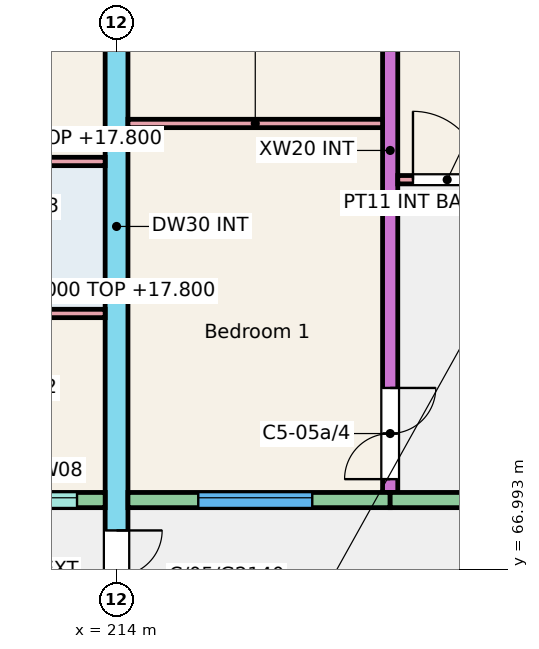
"""IFC4 building model, lengths in metres.
Left out: names, types, materials, properties, quantities, classifications, styles, units other than length and angle.
Written with IfcOpenShell. Run it as: python <this file> out.ifc"""

import sys

from ifc_helpers import new_model, si_unit, direction, frame, frame_2d, origin, place, context, subcontext, project, spatial, rectangle, extrude, element, fill, save


model = new_model("IFC4")
c1 = context("Model", 3, precision=1e-05, world=origin(), true_north=direction((0.0, 1.0)))
c2 = subcontext(c1, "Body", "Model", "MODEL_VIEW")
j1 = project(units=[si_unit("LENGTHUNIT", "METRE"), si_unit("PLANEANGLEUNIT", "RADIAN")], contexts=[c1])
p1 = place(None, origin())
s1 = spatial("IfcSite", under=j1, at=p1, CompositionType="ELEMENT")
p2 = place(p1, origin())
s2 = spatial("IfcBuilding", under=s1, at=p2, CompositionType="ELEMENT")
p3 = place(p2, frame((0.0, 0.0, 15.0)))
s3 = spatial("IfcBuildingStorey", under=s2, at=p3, CompositionType="ELEMENT", Elevation=15.0)
p4 = place(p3, frame((214.0, 66.0, 0.0), z_axis=(0.0, 0.0, 1.0), x_axis=(0.0, 1.0, 0.0)))
e1 = element("IfcWall", 1, at=p4, inside=s3, PredefinedType="SHEAR", context=c2, shape_type="SweptSolid", body=[
    extrude(rectangle(XDim=11.0, YDim=0.3, at=frame_2d((5.5, 0.0))), origin(), (0.0, 0.0, 1.0), 3.0),
])
p5 = place(p4, frame((0.3, 0.0, 0.0)))
e2 = element("IfcOpeningElement", 2, at=p5, cuts=e1, PredefinedType="OPENING", context=c2, shape_type="SweptSolid", body=[
    extrude(rectangle(XDim=1.2, YDim=2.1, at=frame_2d((0.6, 1.05))), frame((0.0, 0.16, 0.0), z_axis=(0.0, -1.0, 0.0), x_axis=(1.0, 0.0, 0.0)), (0.0, 0.0, 1.0), 0.32),
])
p6 = place(p3, frame((217.6, 68.0, 0.0), z_axis=(0.0, 0.0, 1.0), x_axis=(0.0, 1.0, 0.0)))
e3 = element("IfcWall", 3, at=p6, inside=s3, PredefinedType="SHEAR", context=c2, shape_type="SweptSolid", body=[
    extrude(rectangle(XDim=9.0, YDim=0.2, at=frame_2d((4.5, 0.0))), origin(), (0.0, 0.0, 1.0), 3.0),
])
p7 = place(p6, frame((0.175, 0.0, 0.0)))
e4 = element("IfcOpeningElement", 4, at=p7, cuts=e3, PredefinedType="OPENING", context=c2, shape_type="SweptSolid", body=[
    extrude(rectangle(XDim=1.2, YDim=2.1, at=frame_2d((0.6, 1.05))), frame((0.0, 0.11, 0.0), z_axis=(0.0, -1.0, 0.0), x_axis=(1.0, 0.0, 0.0)), (0.0, 0.0, 1.0), 0.22),
])
p8 = place(p6, frame((6.4, 0.0, 0.0)))
e5 = element("IfcOpeningElement", 5, at=p8, cuts=e3, PredefinedType="OPENING", context=c2, shape_type="SweptSolid", body=[
    extrude(rectangle(XDim=1.2, YDim=2.1, at=frame_2d((0.6, 1.05))), frame((0.0, 0.11, 0.0), z_axis=(0.0, -1.0, 0.0), x_axis=(1.0, 0.0, 0.0)), (0.0, 0.0, 1.0), 0.22),
])
p9 = place(p3, frame((210.4, 67.9, 0.0), z_axis=(0.0, 0.0, 1.0), x_axis=(1.0, 0.0, 0.0)))
e6 = element("IfcWall", 6, at=p9, inside=s3, PredefinedType="SOLIDWALL", context=c2, shape_type="SweptSolid", body=[
    extrude(rectangle(XDim=3.45, YDim=0.2, at=frame_2d((1.725, 0.0))), origin(), (0.0, 0.0, 1.0), 3.0),
])
p10 = place(p9, frame((1.88, 0.0, 1.1)))
e7 = element("IfcOpeningElement", 7, at=p10, cuts=e6, PredefinedType="OPENING", context=c2, shape_type="SweptSolid", body=[
    extrude(rectangle(XDim=1.2, YDim=1.3, at=frame_2d((0.6, 0.65))), frame((0.0, 0.11, 0.0), z_axis=(0.0, -1.0, 0.0), x_axis=(1.0, 0.0, 0.0)), (0.0, 0.0, 1.0), 0.22),
])
p11 = place(p9, frame((0.25, 0.0, 0.0)))
e8 = element("IfcOpeningElement", 8, at=p11, cuts=e6, PredefinedType="OPENING", context=c2, shape_type="SweptSolid", body=[
    extrude(rectangle(XDim=1.0, YDim=2.1, at=frame_2d((0.5, 1.05))), frame((0.0, 0.11, 0.0), z_axis=(0.0, -1.0, 0.0), x_axis=(1.0, 0.0, 0.0)), (0.0, 0.0, 1.0), 0.22),
])
p12 = place(p3, frame((214.15, 67.9, 0.0), z_axis=(0.0, 0.0, 1.0), x_axis=(1.0, 0.0, 0.0)))
e9 = element("IfcWall", 9, at=p12, inside=s3, PredefinedType="SOLIDWALL", context=c2, shape_type="SweptSolid", body=[
    extrude(rectangle(XDim=3.45, YDim=0.2, at=frame_2d((1.725, 0.0))), origin(), (0.0, 0.0, 1.0), 3.0),
])
p13 = place(p12, frame((0.925, 0.0, 0.9)))
e10 = element("IfcOpeningElement", 10, at=p13, cuts=e9, PredefinedType="OPENING", context=c2, shape_type="SweptSolid", body=[
    extrude(rectangle(XDim=1.5, YDim=1.5, at=frame_2d((0.75, 0.75))), frame((0.0, 0.11, 0.0), z_axis=(0.0, -1.0, 0.0), x_axis=(1.0, 0.0, 0.0)), (0.0, 0.0, 1.0), 0.22),
])
p14 = place(p3, frame((217.6, 67.9, 0.0), z_axis=(0.0, 0.0, 1.0), x_axis=(1.0, 0.0, 0.0)))
e11 = element("IfcWall", 11, at=p14, inside=s3, PredefinedType="SOLIDWALL", context=c2, shape_type="SweptSolid", body=[
    extrude(rectangle(XDim=3.6, YDim=0.2, at=frame_2d((1.8, 0.0))), origin(), (0.0, 0.0, 1.0), 3.0),
])
p15 = place(p14, frame((1.3, 0.0, 0.0)))
e12 = element("IfcOpeningElement", 12, at=p15, cuts=e11, PredefinedType="OPENING", context=c2, shape_type="SweptSolid", body=[
    extrude(rectangle(XDim=1.0, YDim=2.1, at=frame_2d((0.5, 1.05))), frame((0.0, 0.11, 0.0), z_axis=(0.0, -1.0, 0.0), x_axis=(1.0, 0.0, 0.0)), (0.0, 0.0, 1.0), 0.22),
])
p16 = place(p3, frame((211.91, 70.355, 0.0), z_axis=(0.0, 0.0, 1.0), x_axis=(1.0, 0.0, 0.0)))
e13 = element("IfcWall", 13, at=p16, inside=s3, PredefinedType="PARTITIONING", context=c2, shape_type="SweptSolid", body=[
    extrude(rectangle(XDim=1.94, YDim=0.11, at=frame_2d((0.97, 0.0))), origin(), (0.0, 0.0, 1.0), 2.8),
])
p17 = place(p3, frame((210.5, 72.355, 0.0), z_axis=(0.0, 0.0, 1.0), x_axis=(1.0, 0.0, 0.0)))
e14 = element("IfcWall", 14, at=p17, inside=s3, PredefinedType="PARTITIONING", context=c2, shape_type="SweptSolid", body=[
    extrude(rectangle(XDim=3.35, YDim=0.11, at=frame_2d((1.675, 0.0))), origin(), (0.0, 0.0, 1.0), 2.8),
])
p18 = place(p17, frame((0.2, 0.0, 0.0)))
e15 = element("IfcOpeningElement", 15, at=p18, cuts=e14, PredefinedType="OPENING", context=c2, shape_type="SweptSolid", body=[
    extrude(rectangle(XDim=0.9, YDim=2.1, at=frame_2d((0.45, 1.05))), frame((0.0, 0.065, 0.0), z_axis=(0.0, -1.0, 0.0), x_axis=(1.0, 0.0, 0.0)), (0.0, 0.0, 1.0), 0.13),
])
p19 = place(p3, frame((217.7, 72.115, 0.0), z_axis=(0.0, 0.0, 1.0), x_axis=(1.0, 0.0, 0.0)))
e16 = element("IfcWall", 16, at=p19, inside=s3, PredefinedType="PARTITIONING", context=c2, shape_type="SweptSolid", body=[
    extrude(rectangle(XDim=3.4, YDim=0.11, at=frame_2d((1.7, 0.0))), origin(), (0.0, 0.0, 1.0), 2.8),
])
p20 = place(p19, frame((0.2, 0.0, 0.0)))
e17 = element("IfcOpeningElement", 17, at=p20, cuts=e16, PredefinedType="OPENING", context=c2, shape_type="SweptSolid", body=[
    extrude(rectangle(XDim=0.9, YDim=2.1, at=frame_2d((0.45, 1.05))), frame((0.0, 0.065, 0.0), z_axis=(0.0, -1.0, 0.0), x_axis=(1.0, 0.0, 0.0)), (0.0, 0.0, 1.0), 0.13),
])
p21 = place(p3, frame((214.15, 72.855, 0.0), z_axis=(0.0, 0.0, 1.0), x_axis=(1.0, 0.0, 0.0)))
e18 = element("IfcWall", 18, at=p21, inside=s3, PredefinedType="PARTITIONING", context=c2, shape_type="SweptSolid", body=[
    extrude(rectangle(XDim=3.35, YDim=0.11, at=frame_2d((1.675, 0.0))), origin(), (0.0, 0.0, 1.0), 2.8),
])
p22 = place(p10, origin())
e19 = element("IfcWindow", 19, at=p22, inside=s3, PartitioningType="SINGLE_PANEL", PredefinedType="WINDOW", context=c2, shape_type="SweptSolid", body=[
    extrude(rectangle(XDim=1.2, YDim=1.3, at=frame_2d((0.6, 0.65))), frame((0.0, 0.06, 0.0), z_axis=(0.0, -1.0, 0.0), x_axis=(1.0, 0.0, 0.0)), (0.0, 0.0, 1.0), 0.06),
])
fill(e7, e19)
p23 = place(p13, origin())
e20 = element("IfcWindow", 20, at=p23, inside=s3, PartitioningType="SINGLE_PANEL", PredefinedType="WINDOW", context=c2, shape_type="SweptSolid", body=[
    extrude(rectangle(XDim=1.5, YDim=1.5, at=frame_2d((0.75, 0.75))), frame((0.0, 0.06, 0.0), z_axis=(0.0, -1.0, 0.0), x_axis=(1.0, 0.0, 0.0)), (0.0, 0.0, 1.0), 0.06),
])
fill(e10, e20)
p24 = place(p20, origin())
e21 = element("IfcDoor", 21, at=p24, inside=s3, OperationType="SINGLE_SWING_LEFT", PredefinedType="DOOR", context=c2, shape_type="SweptSolid", body=[
    extrude(rectangle(XDim=0.9, YDim=2.1, at=frame_2d((0.45, 1.05))), frame((0.0, 0.025, 0.0), z_axis=(0.0, -1.0, 0.0), x_axis=(1.0, 0.0, 0.0)), (0.0, 0.0, 1.0), 0.05),
])
fill(e17, e21)
p25 = place(p7, origin())
e22 = element("IfcDoor", 22, at=p25, inside=s3, OperationType="DOUBLE_DOOR_SINGLE_SWING", PredefinedType="DOOR", context=c2, shape_type="SweptSolid", body=[
    extrude(rectangle(XDim=1.2, YDim=2.1, at=frame_2d((0.6, 1.05))), frame((0.0, 0.025, 0.0), z_axis=(0.0, -1.0, 0.0), x_axis=(1.0, 0.0, 0.0)), (0.0, 0.0, 1.0), 0.05),
])
fill(e4, e22)
p26 = place(p5, origin())
e23 = element("IfcDoor", 23, at=p26, inside=s3, OperationType="DOUBLE_DOOR_SINGLE_SWING", PredefinedType="DOOR", context=c2, shape_type="SweptSolid", body=[
    extrude(rectangle(XDim=1.2, YDim=2.1, at=frame_2d((0.6, 1.05))), frame((0.0, 0.025, 0.0), z_axis=(0.0, -1.0, 0.0), x_axis=(1.0, 0.0, 0.0)), (0.0, 0.0, 1.0), 0.05),
])
fill(e2, e23)
save(model, sys.argv[1])
